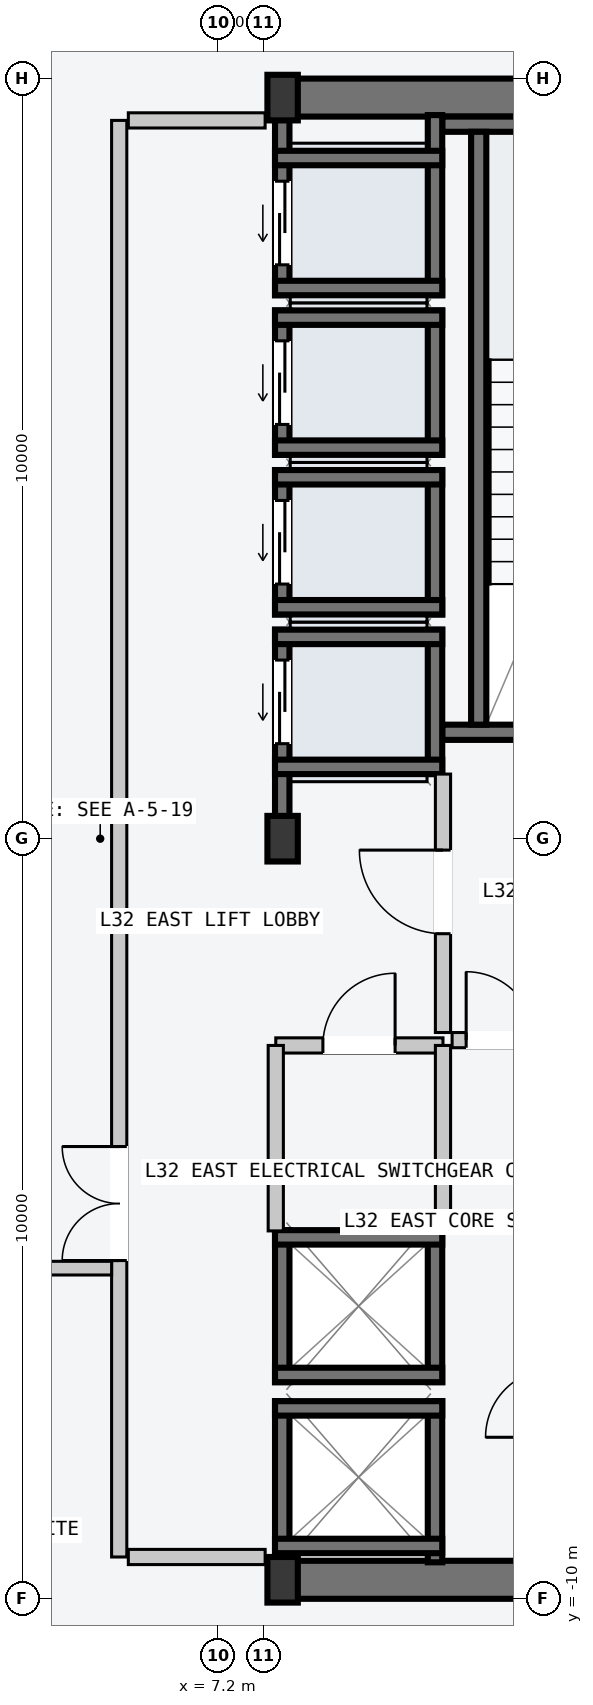
"""IFC4 building model, lengths in metres.
Left out: names, types, materials, properties, quantities, classifications, styles, units other than length and angle.
Written with IfcOpenShell. Run it as: python <this file> out.ifc"""

import sys

from ifc_helpers import new_model, si_unit, direction, frame, frame_2d, origin, origin_2d, place, context, subcontext, project, spatial, rectangle, i_section, extrude, element, fill, save


model = new_model("IFC4")
c1 = context("Model", 3, precision=1e-05, world=origin(), true_north=direction((0.0, 1.0)))
c2 = subcontext(c1, "Body", "Model", "MODEL_VIEW")
j1 = project(units=[si_unit("LENGTHUNIT", "METRE"), si_unit("PLANEANGLEUNIT", "RADIAN")], contexts=[c1])
p1 = place(None, origin())
s1 = spatial("IfcSite", under=j1, at=p1, CompositionType="ELEMENT")
p2 = place(p1, origin())
s2 = spatial("IfcBuilding", under=s1, at=p2, CompositionType="ELEMENT")
p3 = place(p2, frame((0.0, 0.0, 124.2)))
s3 = spatial("IfcBuildingStorey", under=s2, at=p3, CompositionType="ELEMENT", Elevation=124.2)
for number, where, z_axis, x_axis in (
    (1, (8.07, -9.75, -0.2), (0.0, 0.0, 1.0), (1.0, 0.0, 0.0)),
    (2, (8.07, 9.75, -0.2), (0.0, 0.0, 1.0), (1.0, 0.0, 0.0)),
):
    element("IfcWall", number, at=place(p3, frame(where, z_axis=z_axis, x_axis=x_axis)), inside=s3, PredefinedType="SHEAR", context=c2, shape_type="SweptSolid", body=[
        extrude(rectangle(XDim=6.46, YDim=0.5, at=frame_2d((3.23, 0.0))), origin(), (0.0, 0.0, 1.0), 3.6),
    ])
p4 = place(p3, frame((10.15, 1.4, -0.2), z_axis=(0.0, 0.0, 1.0), x_axis=(1.0, 0.0, 0.0)))
e3 = element("IfcWall", 3, at=p4, inside=s3, PredefinedType="SOLIDWALL", context=c2, shape_type="SweptSolid", body=[
    extrude(rectangle(XDim=4.1, YDim=0.2, at=frame_2d((2.05, 0.0))), origin(), (0.0, 0.0, 1.0), 3.6),
])
p5 = place(p4, frame((1.5, 0.0, 0.2)))
e4 = element("IfcOpeningElement", 4, at=p5, cuts=e3, PredefinedType="OPENING", context=c2, shape_type="SweptSolid", body=[
    extrude(rectangle(XDim=1.12, YDim=2.18, at=frame_2d((0.56, 1.09))), frame((0.0, 0.11, 0.0), z_axis=(0.0, -1.0, 0.0), x_axis=(1.0, 0.0, 0.0)), (0.0, 0.0, 1.0), 0.22),
])
p6 = place(p3, frame((10.15, 9.4, -0.2), z_axis=(0.0, 0.0, 1.0), x_axis=(1.0, 0.0, 0.0)))
e5 = element("IfcWall", 5, at=p6, inside=s3, PredefinedType="SOLIDWALL", context=c2, shape_type="SweptSolid", body=[
    extrude(rectangle(XDim=4.1, YDim=0.2, at=frame_2d((2.05, 0.0))), origin(), (0.0, 0.0, 1.0), 3.6),
])
p7 = place(p3, frame((10.63, 1.5, -0.2), z_axis=(0.0, 0.0, 1.0), x_axis=(0.0, 1.0, 0.0)))
e6 = element("IfcWall", 6, at=p7, inside=s3, PredefinedType="SOLIDWALL", context=c2, shape_type="SweptSolid", body=[
    extrude(rectangle(XDim=7.8, YDim=0.2, at=frame_2d((3.9, 0.0))), origin(), (0.0, 0.0, 1.0), 3.6),
])
for number, where, z_axis, x_axis in (
    (7, (8.05, -9.75, 0.0), (0.0, 0.0, 1.0), (1.0, 0.0, 0.0)),
    (8, (8.05, 0.0, 0.0), (0.0, 0.0, 1.0), (1.0, 0.0, 0.0)),
    (9, (8.05, 9.75, 0.0), (0.0, 0.0, 1.0), (1.0, 0.0, 0.0)),
):
    element("IfcColumn", number, at=place(p3, frame(where, z_axis=z_axis, x_axis=x_axis)), inside=s3, PredefinedType="COLUMN", context=c2, shape_type="SweptSolid", body=[
        extrude(i_section(OverallWidth=0.4, OverallDepth=0.6, WebThickness=0.022, FlangeThickness=0.036, at=origin_2d()), origin(), (0.0, 0.0, 1.0), 3.6),
    ])
p8 = place(p3, frame((8.045, 0.21, -0.2), z_axis=(0.0, 0.0, 1.0), x_axis=(0.0, 1.0, 0.0)))
e10 = element("IfcWall", 10, at=p8, inside=s3, PredefinedType="SOLIDWALL", context=c2, shape_type="SweptSolid", body=[
    extrude(rectangle(XDim=2.54, YDim=0.19, at=frame_2d((1.27, 0.0))), origin(), (0.0, 0.0, 1.0), 3.6),
])
p9 = place(p8, frame((1.04, 0.0, 0.2)))
e11 = element("IfcOpeningElement", 11, at=p9, cuts=e10, PredefinedType="OPENING", context=c2, shape_type="SweptSolid", body=[
    extrude(rectangle(XDim=1.1, YDim=2.2, at=frame_2d((0.55, 1.1))), frame((0.0, 0.105, 0.0), z_axis=(0.0, -1.0, 0.0), x_axis=(1.0, 0.0, 0.0)), (0.0, 0.0, 1.0), 0.21),
])
p10 = place(p3, frame((10.055, 0.85, -0.2), z_axis=(0.0, 0.0, 1.0), x_axis=(0.0, 1.0, 0.0)))
e12 = element("IfcWall", 12, at=p10, inside=s3, PredefinedType="SOLIDWALL", context=c2, shape_type="SweptSolid", body=[
    extrude(rectangle(XDim=1.9, YDim=0.19, at=frame_2d((0.95, 0.0))), origin(), (0.0, 0.0, 1.0), 3.6),
])
for number, where, z_axis, x_axis in (
    (13, (7.95, 2.655, -0.2), (0.0, 0.0, 1.0), (1.0, 0.0, 0.0)),
    (14, (7.95, 0.945, -0.2), (0.0, 0.0, 1.0), (1.0, 0.0, 0.0)),
):
    element("IfcWall", number, at=place(p3, frame(where, z_axis=z_axis, x_axis=x_axis)), inside=s3, PredefinedType="SOLIDWALL", context=c2, shape_type="SweptSolid", body=[
        extrude(rectangle(XDim=2.2, YDim=0.19, at=frame_2d((1.1, 0.0))), origin(), (0.0, 0.0, 1.0), 3.6),
    ])
p11 = place(p3, frame((8.045, 2.95, -0.2), z_axis=(0.0, 0.0, 1.0), x_axis=(0.0, 1.0, 0.0)))
e15 = element("IfcWall", 15, at=p11, inside=s3, PredefinedType="SOLIDWALL", context=c2, shape_type="SweptSolid", body=[
    extrude(rectangle(XDim=1.9, YDim=0.19, at=frame_2d((0.95, 0.0))), origin(), (0.0, 0.0, 1.0), 3.6),
])
p12 = place(p11, frame((0.4, 0.0, 0.2)))
e16 = element("IfcOpeningElement", 16, at=p12, cuts=e15, PredefinedType="OPENING", context=c2, shape_type="SweptSolid", body=[
    extrude(rectangle(XDim=1.1, YDim=2.2, at=frame_2d((0.55, 1.1))), frame((0.0, 0.105, 0.0), z_axis=(0.0, -1.0, 0.0), x_axis=(1.0, 0.0, 0.0)), (0.0, 0.0, 1.0), 0.21),
])
p13 = place(p3, frame((10.055, 2.95, -0.2), z_axis=(0.0, 0.0, 1.0), x_axis=(0.0, 1.0, 0.0)))
e17 = element("IfcWall", 17, at=p13, inside=s3, PredefinedType="SOLIDWALL", context=c2, shape_type="SweptSolid", body=[
    extrude(rectangle(XDim=1.9, YDim=0.19, at=frame_2d((0.95, 0.0))), origin(), (0.0, 0.0, 1.0), 3.6),
])
for number, where, z_axis, x_axis in (
    (18, (7.95, 4.755, -0.2), (0.0, 0.0, 1.0), (1.0, 0.0, 0.0)),
    (19, (7.95, 3.045, -0.2), (0.0, 0.0, 1.0), (1.0, 0.0, 0.0)),
):
    element("IfcWall", number, at=place(p3, frame(where, z_axis=z_axis, x_axis=x_axis)), inside=s3, PredefinedType="SOLIDWALL", context=c2, shape_type="SweptSolid", body=[
        extrude(rectangle(XDim=2.2, YDim=0.19, at=frame_2d((1.1, 0.0))), origin(), (0.0, 0.0, 1.0), 3.6),
    ])
p14 = place(p3, frame((8.045, 5.05, -0.2), z_axis=(0.0, 0.0, 1.0), x_axis=(0.0, 1.0, 0.0)))
e20 = element("IfcWall", 20, at=p14, inside=s3, PredefinedType="SOLIDWALL", context=c2, shape_type="SweptSolid", body=[
    extrude(rectangle(XDim=1.9, YDim=0.19, at=frame_2d((0.95, 0.0))), origin(), (0.0, 0.0, 1.0), 3.6),
])
p15 = place(p14, frame((0.4, 0.0, 0.2)))
e21 = element("IfcOpeningElement", 21, at=p15, cuts=e20, PredefinedType="OPENING", context=c2, shape_type="SweptSolid", body=[
    extrude(rectangle(XDim=1.1, YDim=2.2, at=frame_2d((0.55, 1.1))), frame((0.0, 0.105, 0.0), z_axis=(0.0, -1.0, 0.0), x_axis=(1.0, 0.0, 0.0)), (0.0, 0.0, 1.0), 0.21),
])
p16 = place(p3, frame((10.055, 5.05, -0.2), z_axis=(0.0, 0.0, 1.0), x_axis=(0.0, 1.0, 0.0)))
e22 = element("IfcWall", 22, at=p16, inside=s3, PredefinedType="SOLIDWALL", context=c2, shape_type="SweptSolid", body=[
    extrude(rectangle(XDim=1.9, YDim=0.19, at=frame_2d((0.95, 0.0))), origin(), (0.0, 0.0, 1.0), 3.6),
])
for number, where, z_axis, x_axis in (
    (23, (7.95, 6.855, -0.2), (0.0, 0.0, 1.0), (1.0, 0.0, 0.0)),
    (24, (7.95, 5.145, -0.2), (0.0, 0.0, 1.0), (1.0, 0.0, 0.0)),
):
    element("IfcWall", number, at=place(p3, frame(where, z_axis=z_axis, x_axis=x_axis)), inside=s3, PredefinedType="SOLIDWALL", context=c2, shape_type="SweptSolid", body=[
        extrude(rectangle(XDim=2.2, YDim=0.19, at=frame_2d((1.1, 0.0))), origin(), (0.0, 0.0, 1.0), 3.6),
    ])
p17 = place(p3, frame((8.045, 7.15, -0.2), z_axis=(0.0, 0.0, 1.0), x_axis=(0.0, 1.0, 0.0)))
e25 = element("IfcWall", 25, at=p17, inside=s3, PredefinedType="SOLIDWALL", context=c2, shape_type="SweptSolid", body=[
    extrude(rectangle(XDim=2.37, YDim=0.19, at=frame_2d((1.185, 0.0))), origin(), (0.0, 0.0, 1.0), 3.6),
])
p18 = place(p17, frame((0.4, 0.0, 0.2)))
e26 = element("IfcOpeningElement", 26, at=p18, cuts=e25, PredefinedType="OPENING", context=c2, shape_type="SweptSolid", body=[
    extrude(rectangle(XDim=1.1, YDim=2.2, at=frame_2d((0.55, 1.1))), frame((0.0, 0.105, 0.0), z_axis=(0.0, -1.0, 0.0), x_axis=(1.0, 0.0, 0.0)), (0.0, 0.0, 1.0), 0.21),
])
p19 = place(p3, frame((10.055, 7.15, -0.2), z_axis=(0.0, 0.0, 1.0), x_axis=(0.0, 1.0, 0.0)))
e27 = element("IfcWall", 27, at=p19, inside=s3, PredefinedType="SOLIDWALL", context=c2, shape_type="SweptSolid", body=[
    extrude(rectangle(XDim=2.37, YDim=0.19, at=frame_2d((1.185, 0.0))), origin(), (0.0, 0.0, 1.0), 3.6),
])
for number, where, z_axis, x_axis in (
    (28, (7.95, 8.955, -0.2), (0.0, 0.0, 1.0), (1.0, 0.0, 0.0)),
    (29, (7.95, 7.245, -0.2), (0.0, 0.0, 1.0), (1.0, 0.0, 0.0)),
):
    element("IfcWall", number, at=place(p3, frame(where, z_axis=z_axis, x_axis=x_axis)), inside=s3, PredefinedType="SOLIDWALL", context=c2, shape_type="SweptSolid", body=[
        extrude(rectangle(XDim=2.2, YDim=0.19, at=frame_2d((1.1, 0.0))), origin(), (0.0, 0.0, 1.0), 3.6),
    ])
for number, where, z_axis, x_axis in (
    (30, (8.045, -9.52, -0.2), (0.0, 0.0, 1.0), (0.0, 1.0, 0.0)),
    (31, (10.055, -9.52, -0.2), (0.0, 0.0, 1.0), (0.0, 1.0, 0.0)),
):
    element("IfcWall", number, at=place(p3, frame(where, z_axis=z_axis, x_axis=x_axis)), inside=s3, PredefinedType="SOLIDWALL", context=c2, shape_type="SweptSolid", body=[
        extrude(rectangle(XDim=2.12, YDim=0.19, at=frame_2d((1.06, 0.0))), origin(), (0.0, 0.0, 1.0), 3.6),
    ])
for number, where, z_axis, x_axis in (
    (32, (7.95, -7.495, -0.2), (0.0, 0.0, 1.0), (1.0, 0.0, 0.0)),
    (33, (7.95, -9.305, -0.2), (0.0, 0.0, 1.0), (1.0, 0.0, 0.0)),
):
    element("IfcWall", number, at=place(p3, frame(where, z_axis=z_axis, x_axis=x_axis)), inside=s3, PredefinedType="SOLIDWALL", context=c2, shape_type="SweptSolid", body=[
        extrude(rectangle(XDim=2.2, YDim=0.19, at=frame_2d((1.1, 0.0))), origin(), (0.0, 0.0, 1.0), 3.6),
    ])
for number, where, z_axis, x_axis in (
    (34, (8.045, -7.15, -0.2), (0.0, 0.0, 1.0), (0.0, 1.0, 0.0)),
    (35, (10.055, -7.15, -0.2), (0.0, 0.0, 1.0), (0.0, 1.0, 0.0)),
):
    element("IfcWall", number, at=place(p3, frame(where, z_axis=z_axis, x_axis=x_axis)), inside=s3, PredefinedType="SOLIDWALL", context=c2, shape_type="SweptSolid", body=[
        extrude(rectangle(XDim=2.0, YDim=0.19, at=frame_2d((1.0, 0.0))), origin(), (0.0, 0.0, 1.0), 3.6),
    ])
for number, where, z_axis, x_axis in (
    (36, (7.95, -5.245, -0.2), (0.0, 0.0, 1.0), (1.0, 0.0, 0.0)),
    (37, (7.95, -7.055, -0.2), (0.0, 0.0, 1.0), (1.0, 0.0, 0.0)),
):
    element("IfcWall", number, at=place(p3, frame(where, z_axis=z_axis, x_axis=x_axis)), inside=s3, PredefinedType="SOLIDWALL", context=c2, shape_type="SweptSolid", body=[
        extrude(rectangle(XDim=2.2, YDim=0.19, at=frame_2d((1.1, 0.0))), origin(), (0.0, 0.0, 1.0), 3.6),
    ])
p20 = place(p3, frame((5.9, -9.45, 0.0), z_axis=(0.0, 0.0, 1.0), x_axis=(0.0, 1.0, 0.0)))
e38 = element("IfcWall", 38, at=p20, inside=s3, PredefinedType="PARTITIONING", context=c2, shape_type="SweptSolid", body=[
    extrude(rectangle(XDim=18.9, YDim=0.2, at=frame_2d((9.45, 0.0))), origin(), (0.0, 0.0, 1.0), 3.4),
])
p21 = place(p20, frame((3.9, 0.0, 0.0)))
e39 = element("IfcOpeningElement", 39, at=p21, cuts=e38, PredefinedType="OPENING", context=c2, shape_type="SweptSolid", body=[
    extrude(rectangle(XDim=1.5, YDim=2.2, at=frame_2d((0.75, 1.1))), frame((0.0, 0.11, 0.0), z_axis=(0.0, -1.0, 0.0), x_axis=(1.0, 0.0, 0.0)), (0.0, 0.0, 1.0), 0.22),
])
for number, where, z_axis, x_axis in (
    (40, (6.02, -9.45, 0.0), (0.0, 0.0, 1.0), (1.0, 0.0, 0.0)),
    (41, (6.02, 9.45, 0.0), (0.0, 0.0, 1.0), (1.0, 0.0, 0.0)),
):
    element("IfcWall", number, at=place(p3, frame(where, z_axis=z_axis, x_axis=x_axis)), inside=s3, PredefinedType="PARTITIONING", context=c2, shape_type="SweptSolid", body=[
        extrude(rectangle(XDim=1.8, YDim=0.2, at=frame_2d((0.9, 0.0))), origin(), (0.0, 0.0, 1.0), 3.4),
    ])
p22 = place(p3, frame((10.16, -2.55, 0.0), z_axis=(0.0, 0.0, 1.0), x_axis=(0.0, 1.0, 0.0)))
e42 = element("IfcWall", 42, at=p22, inside=s3, PredefinedType="PARTITIONING", context=c2, shape_type="SweptSolid", body=[
    extrude(rectangle(XDim=3.4, YDim=0.2, at=frame_2d((1.7, 0.0))), origin(), (0.0, 0.0, 1.0), 3.4),
])
p23 = place(p22, frame((1.3, 0.0, 0.0)))
e43 = element("IfcOpeningElement", 43, at=p23, cuts=e42, PredefinedType="OPENING", context=c2, shape_type="SweptSolid", body=[
    extrude(rectangle(XDim=1.1, YDim=2.15, at=frame_2d((0.55, 1.075))), frame((0.0, 0.11, 0.0), z_axis=(0.0, -1.0, 0.0), x_axis=(1.0, 0.0, 0.0)), (0.0, 0.0, 1.0), 0.22),
])
p24 = place(p3, frame((10.28, -2.65, 0.0), z_axis=(0.0, 0.0, 1.0), x_axis=(1.0, 0.0, 0.0)))
e44 = element("IfcWall", 44, at=p24, inside=s3, PredefinedType="PARTITIONING", context=c2, shape_type="SweptSolid", body=[
    extrude(rectangle(XDim=1.27, YDim=0.2, at=frame_2d((0.635, 0.0))), origin(), (0.0, 0.0, 1.0), 3.4),
])
p25 = place(p24, frame((0.185, 0.0, 0.0)))
e45 = element("IfcOpeningElement", 45, at=p25, cuts=e44, PredefinedType="OPENING", context=c2, shape_type="SweptSolid", body=[
    extrude(rectangle(XDim=0.9, YDim=2.15, at=frame_2d((0.45, 1.075))), frame((0.0, 0.11, 0.0), z_axis=(0.0, -1.0, 0.0), x_axis=(1.0, 0.0, 0.0)), (0.0, 0.0, 1.0), 0.22),
])
p26 = place(p3, frame((7.96, -2.72, 0.0), z_axis=(0.0, 0.0, 1.0), x_axis=(1.0, 0.0, 0.0)))
e46 = element("IfcWall", 46, at=p26, inside=s3, PredefinedType="PARTITIONING", context=c2, shape_type="SweptSolid", body=[
    extrude(rectangle(XDim=2.2, YDim=0.2, at=frame_2d((1.1, 0.0))), origin(), (0.0, 0.0, 1.0), 3.4),
])
p27 = place(p26, frame((0.62, 0.0, 0.0)))
e47 = element("IfcOpeningElement", 47, at=p27, cuts=e46, PredefinedType="OPENING", context=c2, shape_type="SweptSolid", body=[
    extrude(rectangle(XDim=0.95, YDim=2.1, at=frame_2d((0.475, 1.05))), frame((0.0, 0.11, 0.0), z_axis=(0.0, -1.0, 0.0), x_axis=(1.0, 0.0, 0.0)), (0.0, 0.0, 1.0), 0.22),
])
for number, where, z_axis, x_axis in (
    (48, (7.96, -5.16, 0.0), (0.0, 0.0, 1.0), (0.0, 1.0, 0.0)),
    (49, (10.16, -5.16, 0.0), (0.0, 0.0, 1.0), (0.0, 1.0, 0.0)),
):
    element("IfcWall", number, at=place(p3, frame(where, z_axis=z_axis, x_axis=x_axis)), inside=s3, PredefinedType="PARTITIONING", context=c2, shape_type="SweptSolid", body=[
        extrude(rectangle(XDim=2.44, YDim=0.2, at=frame_2d((1.22, 0.0))), origin(), (0.0, 0.0, 1.0), 3.4),
    ])
p28 = place(p3, frame((-5.8, -5.65, 0.0), z_axis=(0.0, 0.0, 1.0), x_axis=(1.0, 0.0, 0.0)))
e50 = element("IfcWall", 50, at=p28, inside=s3, PredefinedType="PARTITIONING", context=c2, shape_type="SweptSolid", body=[
    extrude(rectangle(XDim=11.6, YDim=0.18, at=frame_2d((5.8, 0.0))), origin(), (0.0, 0.0, 1.0), 3.4),
])
p29 = place(p28, frame((5.1, 0.0, 0.0)))
e51 = element("IfcOpeningElement", 51, at=p29, cuts=e50, PredefinedType="OPENING", context=c2, shape_type="SweptSolid", body=[
    extrude(rectangle(XDim=1.4, YDim=2.2, at=frame_2d((0.7, 1.1))), frame((0.0, 0.1, 0.0), z_axis=(0.0, -1.0, 0.0), x_axis=(1.0, 0.0, 0.0)), (0.0, 0.0, 1.0), 0.2),
])
p30 = place(p9, origin())
e52 = element("IfcDoor", 52, at=p30, inside=s3, OperationType="SLIDING_TO_LEFT", PredefinedType="DOOR", context=c2, shape_type="SweptSolid", body=[
    extrude(rectangle(XDim=1.1, YDim=2.2, at=frame_2d((0.55, 1.1))), frame((0.0, 0.025, 0.0), z_axis=(0.0, -1.0, 0.0), x_axis=(1.0, 0.0, 0.0)), (0.0, 0.0, 1.0), 0.05),
])
fill(e11, e52)
p31 = place(p12, origin())
e53 = element("IfcDoor", 53, at=p31, inside=s3, OperationType="SLIDING_TO_LEFT", PredefinedType="DOOR", context=c2, shape_type="SweptSolid", body=[
    extrude(rectangle(XDim=1.1, YDim=2.2, at=frame_2d((0.55, 1.1))), frame((0.0, 0.025, 0.0), z_axis=(0.0, -1.0, 0.0), x_axis=(1.0, 0.0, 0.0)), (0.0, 0.0, 1.0), 0.05),
])
fill(e16, e53)
p32 = place(p15, origin())
e54 = element("IfcDoor", 54, at=p32, inside=s3, OperationType="SLIDING_TO_LEFT", PredefinedType="DOOR", context=c2, shape_type="SweptSolid", body=[
    extrude(rectangle(XDim=1.1, YDim=2.2, at=frame_2d((0.55, 1.1))), frame((0.0, 0.025, 0.0), z_axis=(0.0, -1.0, 0.0), x_axis=(1.0, 0.0, 0.0)), (0.0, 0.0, 1.0), 0.05),
])
fill(e21, e54)
p33 = place(p18, origin())
e55 = element("IfcDoor", 55, at=p33, inside=s3, OperationType="SLIDING_TO_LEFT", PredefinedType="DOOR", context=c2, shape_type="SweptSolid", body=[
    extrude(rectangle(XDim=1.1, YDim=2.2, at=frame_2d((0.55, 1.1))), frame((0.0, 0.025, 0.0), z_axis=(0.0, -1.0, 0.0), x_axis=(1.0, 0.0, 0.0)), (0.0, 0.0, 1.0), 0.05),
])
fill(e26, e55)
p34 = place(p21, origin())
e56 = element("IfcDoor", 56, at=p34, inside=s3, OperationType="DOUBLE_DOOR_SINGLE_SWING", PredefinedType="DOOR", context=c2, shape_type="SweptSolid", body=[
    extrude(rectangle(XDim=1.5, YDim=2.2, at=frame_2d((0.75, 1.1))), frame((0.0, 0.025, 0.0), z_axis=(0.0, -1.0, 0.0), x_axis=(1.0, 0.0, 0.0)), (0.0, 0.0, 1.0), 0.05),
])
fill(e39, e56)
p35 = place(p23, origin())
e57 = element("IfcDoor", 57, at=p35, inside=s3, OperationType="SINGLE_SWING_RIGHT", PredefinedType="DOOR", context=c2, shape_type="SweptSolid", body=[
    extrude(rectangle(XDim=1.1, YDim=2.15, at=frame_2d((0.55, 1.075))), frame((0.0, 0.025, 0.0), z_axis=(0.0, -1.0, 0.0), x_axis=(1.0, 0.0, 0.0)), (0.0, 0.0, 1.0), 0.05),
])
fill(e43, e57)
p36 = place(p25, origin())
e58 = element("IfcDoor", 58, at=p36, inside=s3, OperationType="SINGLE_SWING_LEFT", PredefinedType="DOOR", context=c2, shape_type="SweptSolid", body=[
    extrude(rectangle(XDim=0.9, YDim=2.15, at=frame_2d((0.45, 1.075))), frame((0.0, 0.025, 0.0), z_axis=(0.0, -1.0, 0.0), x_axis=(1.0, 0.0, 0.0)), (0.0, 0.0, 1.0), 0.05),
])
fill(e45, e58)
p37 = place(p27, origin())
e59 = element("IfcDoor", 59, at=p37, inside=s3, OperationType="SINGLE_SWING_RIGHT", PredefinedType="DOOR", context=c2, shape_type="SweptSolid", body=[
    extrude(rectangle(XDim=0.95, YDim=2.1, at=frame_2d((0.475, 1.05))), frame((0.0, 0.025, 0.0), z_axis=(0.0, -1.0, 0.0), x_axis=(1.0, 0.0, 0.0)), (0.0, 0.0, 1.0), 0.05),
])
fill(e47, e59)
save(model, sys.argv[1])
